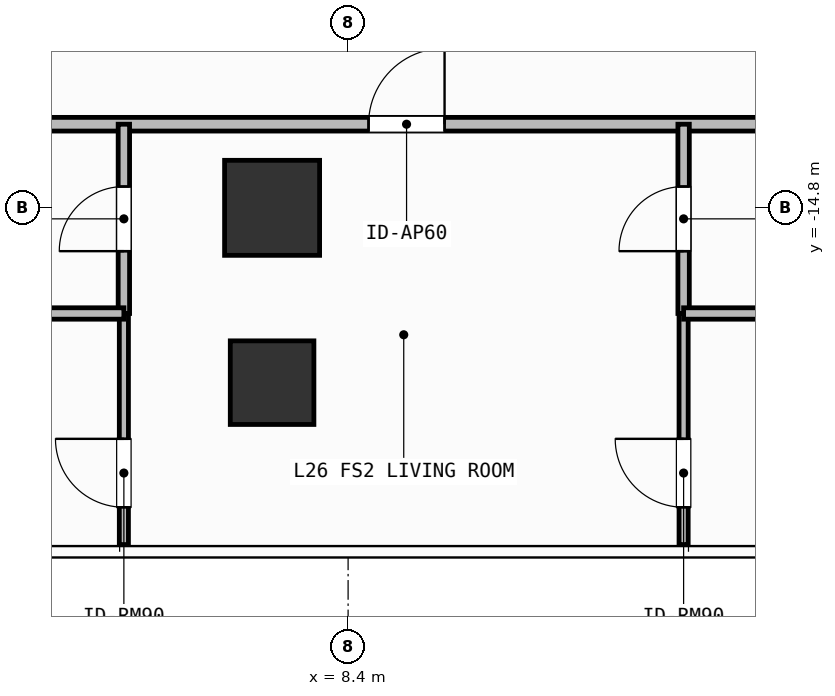
"""IFC4 building model, lengths in metres.
Left out: names, types, materials, properties, quantities, classifications, styles, units other than length and angle.
Written with IfcOpenShell. Run it as: python <this file> out.ifc"""

import sys

from ifc_helpers import new_model, si_unit, direction, frame, frame_2d, origin, origin_2d, place, context, subcontext, project, spatial, rectangle, extrude, element, fill, save


model = new_model("IFC4")
c1 = context("Model", 3, precision=1e-05, world=origin(), true_north=direction((0.0, 1.0)))
c2 = subcontext(c1, "Body", "Model", "MODEL_VIEW")
j1 = project(units=[si_unit("LENGTHUNIT", "METRE"), si_unit("PLANEANGLEUNIT", "RADIAN")], contexts=[c1])
p1 = place(None, origin())
s1 = spatial("IfcSite", under=j1, at=p1, CompositionType="ELEMENT")
p2 = place(p1, origin())
s2 = spatial("IfcBuilding", under=s1, at=p2, CompositionType="ELEMENT")
p3 = place(p2, frame((0.0, 0.0, 104.7)))
s3 = spatial("IfcBuildingStorey", under=s2, at=p3, CompositionType="ELEMENT", Elevation=104.7)
p4 = place(p3, frame((7.4, -14.8, 0.0), z_axis=(0.0, 0.0, 1.0), x_axis=(1.0, 0.0, 0.0)))
e1 = element("IfcColumn", 1, at=p4, inside=s3, PredefinedType="COLUMN", context=c2, shape_type="SweptSolid", body=[
    extrude(rectangle(XDim=1.25, YDim=1.25, at=origin_2d()), origin(), (0.0, 0.0, 1.0), 3.9),
])
p5 = place(p3, frame((7.4, -17.1, 0.0), z_axis=(0.0, 0.0, 1.0), x_axis=(1.0, 0.0, 0.0)))
e2 = element("IfcColumn", 2, at=p5, inside=s3, PredefinedType="COLUMN", context=c2, shape_type="SweptSolid", body=[
    extrude(rectangle(XDim=1.1, YDim=1.1, at=origin_2d()), origin(), (0.0, 0.0, 1.0), 3.9),
])
p6 = place(p3, frame((0.974, -13.7, 0.0), z_axis=(0.0, 0.0, 1.0), x_axis=(1.0, 0.0, 0.0)))
e3 = element("IfcWall", 3, at=p6, inside=s3, PredefinedType="PARTITIONING", context=c2, shape_type="SweptSolid", body=[
    extrude(rectangle(XDim=17.646, YDim=0.18, at=frame_2d((8.823, 0.0))), origin(), (0.0, 0.0, 1.0), 3.62),
])
p7 = place(p6, frame((7.695, 0.0, 0.0)))
e4 = element("IfcOpeningElement", 4, at=p7, cuts=e3, PredefinedType="OPENING", context=c2, shape_type="SweptSolid", body=[
    extrude(rectangle(XDim=1.0, YDim=2.2, at=frame_2d((0.5, 1.1))), frame((0.0, 0.1, 0.0), z_axis=(0.0, -1.0, 0.0), x_axis=(1.0, 0.0, 0.0)), (0.0, 0.0, 1.0), 0.2),
])
p8 = place(p3, frame((5.45, -16.19, 0.0), z_axis=(0.0, 0.0, 1.0), x_axis=(0.0, 1.0, 0.0)))
e5 = element("IfcWall", 5, at=p8, inside=s3, PredefinedType="PARTITIONING", context=c2, shape_type="SweptSolid", body=[
    extrude(rectangle(XDim=2.49, YDim=0.15, at=frame_2d((1.245, 0.0))), origin(), (0.0, 0.0, 1.0), 3.62),
])
p9 = place(p8, frame((0.82, 0.0, 0.0)))
e6 = element("IfcOpeningElement", 6, at=p9, cuts=e5, PredefinedType="OPENING", context=c2, shape_type="SweptSolid", body=[
    extrude(rectangle(XDim=0.85, YDim=2.1, at=frame_2d((0.425, 1.05))), frame((0.0, 0.085, 0.0), z_axis=(0.0, -1.0, 0.0), x_axis=(1.0, 0.0, 0.0)), (0.0, 0.0, 1.0), 0.17),
])
p10 = place(p3, frame((5.45, -19.23, 0.0), z_axis=(0.0, 0.0, 1.0), x_axis=(0.0, 1.0, 0.0)))
e7 = element("IfcWall", 7, at=p10, inside=s3, PredefinedType="PARTITIONING", context=c2, shape_type="SweptSolid", body=[
    extrude(rectangle(XDim=3.04, YDim=0.12, at=frame_2d((1.52, 0.0))), origin(), (0.0, 0.0, 1.0), 3.62),
])
p11 = place(p10, frame((0.491, 0.0, 0.0)))
e8 = element("IfcOpeningElement", 8, at=p11, cuts=e7, PredefinedType="OPENING", context=c2, shape_type="SweptSolid", body=[
    extrude(rectangle(XDim=0.9, YDim=2.1, at=frame_2d((0.45, 1.05))), frame((0.0, 0.07, 0.0), z_axis=(0.0, -1.0, 0.0), x_axis=(1.0, 0.0, 0.0)), (0.0, 0.0, 1.0), 0.14),
])
p12 = place(p3, frame((12.814, -16.19, 0.0), z_axis=(0.0, 0.0, 1.0), x_axis=(0.0, 1.0, 0.0)))
e9 = element("IfcWall", 9, at=p12, inside=s3, PredefinedType="PARTITIONING", context=c2, shape_type="SweptSolid", body=[
    extrude(rectangle(XDim=2.49, YDim=0.15, at=frame_2d((1.245, 0.0))), origin(), (0.0, 0.0, 1.0), 3.62),
])
p13 = place(p12, frame((0.82, 0.0, 0.0)))
e10 = element("IfcOpeningElement", 10, at=p13, cuts=e9, PredefinedType="OPENING", context=c2, shape_type="SweptSolid", body=[
    extrude(rectangle(XDim=0.85, YDim=2.1, at=frame_2d((0.425, 1.05))), frame((0.0, 0.085, 0.0), z_axis=(0.0, -1.0, 0.0), x_axis=(1.0, 0.0, 0.0)), (0.0, 0.0, 1.0), 0.17),
])
p14 = place(p3, frame((12.814, -19.23, 0.0), z_axis=(0.0, 0.0, 1.0), x_axis=(0.0, 1.0, 0.0)))
e11 = element("IfcWall", 11, at=p14, inside=s3, PredefinedType="PARTITIONING", context=c2, shape_type="SweptSolid", body=[
    extrude(rectangle(XDim=3.04, YDim=0.12, at=frame_2d((1.52, 0.0))), origin(), (0.0, 0.0, 1.0), 3.62),
])
p15 = place(p14, frame((0.491, 0.0, 0.0)))
e12 = element("IfcOpeningElement", 12, at=p15, cuts=e11, PredefinedType="OPENING", context=c2, shape_type="SweptSolid", body=[
    extrude(rectangle(XDim=0.9, YDim=2.1, at=frame_2d((0.45, 1.05))), frame((0.0, 0.07, 0.0), z_axis=(0.0, -1.0, 0.0), x_axis=(1.0, 0.0, 0.0)), (0.0, 0.0, 1.0), 0.14),
])
p16 = place(p3, frame((0.974, -16.19, 0.0), z_axis=(0.0, 0.0, 1.0), x_axis=(1.0, 0.0, 0.0)))
e13 = element("IfcWall", 13, at=p16, inside=s3, PredefinedType="PARTITIONING", context=c2, shape_type="SweptSolid", body=[
    extrude(rectangle(XDim=4.476, YDim=0.15, at=frame_2d((2.238, 0.0))), origin(), (0.0, 0.0, 1.0), 3.62),
])
p17 = place(p3, frame((12.814, -16.19, 0.0), z_axis=(0.0, 0.0, 1.0), x_axis=(1.0, 0.0, 0.0)))
e14 = element("IfcWall", 14, at=p17, inside=s3, PredefinedType="PARTITIONING", context=c2, shape_type="SweptSolid", body=[
    extrude(rectangle(XDim=5.806, YDim=0.15, at=frame_2d((2.903, 0.0))), origin(), (0.0, 0.0, 1.0), 3.62),
])
p18 = place(p7, origin())
e15 = element("IfcDoor", 15, at=p18, inside=s3, OperationType="SINGLE_SWING_RIGHT", PredefinedType="DOOR", context=c2, shape_type="SweptSolid", body=[
    extrude(rectangle(XDim=1.0, YDim=2.2, at=frame_2d((0.5, 1.1))), frame((0.0, 0.025, 0.0), z_axis=(0.0, -1.0, 0.0), x_axis=(1.0, 0.0, 0.0)), (0.0, 0.0, 1.0), 0.05),
])
fill(e4, e15)
p19 = place(p9, origin())
e16 = element("IfcDoor", 16, at=p19, inside=s3, OperationType="SINGLE_SWING_LEFT", PredefinedType="DOOR", context=c2, shape_type="SweptSolid", body=[
    extrude(rectangle(XDim=0.85, YDim=2.1, at=frame_2d((0.425, 1.05))), frame((0.0, 0.025, 0.0), z_axis=(0.0, -1.0, 0.0), x_axis=(1.0, 0.0, 0.0)), (0.0, 0.0, 1.0), 0.05),
])
fill(e6, e16)
p20 = place(p11, origin())
e17 = element("IfcDoor", 17, at=p20, inside=s3, OperationType="SINGLE_SWING_RIGHT", PredefinedType="DOOR", context=c2, shape_type="SweptSolid", body=[
    extrude(rectangle(XDim=0.9, YDim=2.1, at=frame_2d((0.45, 1.05))), frame((0.0, 0.025, 0.0), z_axis=(0.0, -1.0, 0.0), x_axis=(1.0, 0.0, 0.0)), (0.0, 0.0, 1.0), 0.05),
])
fill(e8, e17)
p21 = place(p13, origin())
e18 = element("IfcDoor", 18, at=p21, inside=s3, OperationType="SINGLE_SWING_LEFT", PredefinedType="DOOR", context=c2, shape_type="SweptSolid", body=[
    extrude(rectangle(XDim=0.85, YDim=2.1, at=frame_2d((0.425, 1.05))), frame((0.0, 0.025, 0.0), z_axis=(0.0, -1.0, 0.0), x_axis=(1.0, 0.0, 0.0)), (0.0, 0.0, 1.0), 0.05),
])
fill(e10, e18)
p22 = place(p15, origin())
e19 = element("IfcDoor", 19, at=p22, inside=s3, OperationType="SINGLE_SWING_RIGHT", PredefinedType="DOOR", context=c2, shape_type="SweptSolid", body=[
    extrude(rectangle(XDim=0.9, YDim=2.1, at=frame_2d((0.45, 1.05))), frame((0.0, 0.025, 0.0), z_axis=(0.0, -1.0, 0.0), x_axis=(1.0, 0.0, 0.0)), (0.0, 0.0, 1.0), 0.05),
])
fill(e12, e19)
save(model, sys.argv[1])
